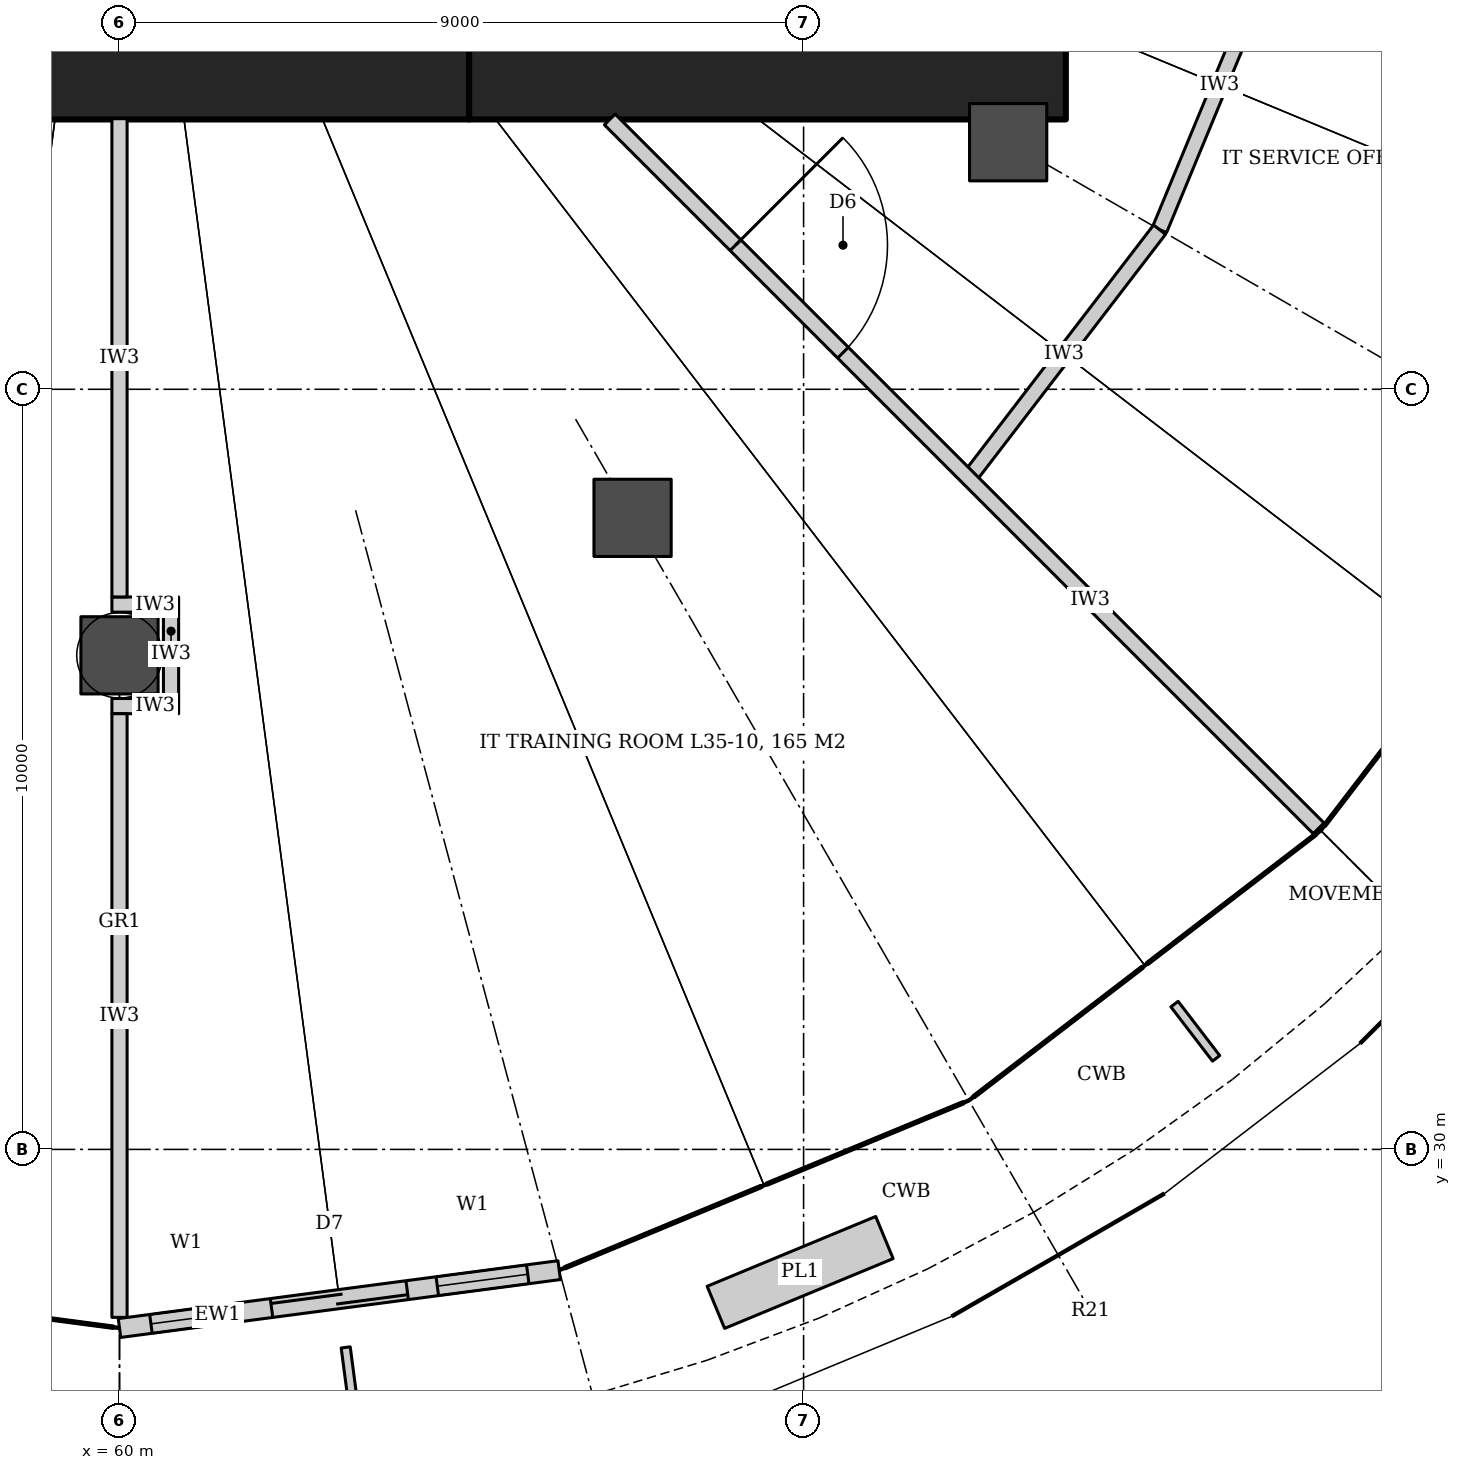
"""IFC4 building model, lengths in metres.
Left out: names, types, materials, properties, quantities, classifications, styles, units other than length and angle.
Written with IfcOpenShell. Run it as: python <this file> out.ifc"""

import sys

from ifc_helpers import new_model, si_unit, direction, frame, frame_2d, origin, origin_2d, place, context, subcontext, project, spatial, rectangle, hollow_circle, extrude, element, fill, save


model = new_model("IFC4")
c1 = context("Model", 3, precision=1e-05, world=origin(), true_north=direction((0.0, 1.0)))
c2 = subcontext(c1, "Body", "Model", "MODEL_VIEW")
j1 = project(units=[si_unit("LENGTHUNIT", "METRE"), si_unit("PLANEANGLEUNIT", "RADIAN")], contexts=[c1])
p1 = place(None, origin())
s1 = spatial("IfcSite", under=j1, at=p1, CompositionType="ELEMENT")
p2 = place(p1, origin())
s2 = spatial("IfcBuilding", under=s1, at=p2, CompositionType="ELEMENT")
p3 = place(p2, frame((0.0, 0.0, 147.8)))
s3 = spatial("IfcBuildingStorey", under=s2, at=p3, CompositionType="ELEMENT", Elevation=147.8)
p4 = place(p3, frame((55.4, 44.45, 0.0), z_axis=(0.0, 0.0, 1.0), x_axis=(1.0, 0.0, 0.0)))
e1 = element("IfcWall", 1, at=p4, inside=s3, PredefinedType="SHEAR", context=c2, shape_type="SweptSolid", body=[
    extrude(rectangle(XDim=9.2, YDim=1.8, at=frame_2d((4.6, 0.0))), origin(), (0.0, 0.0, 1.0), 4.2),
])
p5 = place(p3, frame((64.6, 44.45, 0.0), z_axis=(0.0, 0.0, 1.0), x_axis=(1.0, 0.0, 0.0)))
e2 = element("IfcWall", 2, at=p5, inside=s3, PredefinedType="SHEAR", context=c2, shape_type="SweptSolid", body=[
    extrude(rectangle(XDim=7.85, YDim=1.8, at=frame_2d((3.925, 0.0))), origin(), (0.0, 0.0, 1.0), 4.2),
])
for number, where, z_axis, x_axis in (
    (3, (60.0, 36.5, 0.0), (0.0, 0.0, 1.0), (1.0, 0.0, 0.0)),
    (4, (66.75, 38.309, 0.0), (0.0, 0.0, 1.0), (1.0, 0.0, 0.0)),
    (5, (71.691, 43.25, 0.0), (0.0, 0.0, 1.0), (1.0, 0.0, 0.0)),
):
    element("IfcColumn", number, at=place(p3, frame(where, z_axis=z_axis, x_axis=x_axis)), inside=s3, PredefinedType="COLUMN", context=c2, shape_type="SweptSolid", body=[
        extrude(hollow_circle(Radius=0.508, WallThickness=0.05, at=origin_2d()), origin(), (0.0, 0.0, 1.0), 4.2),
    ])
p6 = place(p3, frame((75.262, 45.911, 0.0), z_axis=(0.0, 0.0, 1.0), x_axis=(-0.382731667114, -0.923859551549, 0.0)))
e6 = element("IfcWall", 6, at=p6, inside=s3, PredefinedType="PARTITIONING", context=c2, shape_type="SweptSolid", body=[
    extrude(rectangle(XDim=4.125, YDim=0.2, at=frame_2d((2.062, 0.0))), origin(), (0.0, 0.0, 1.0), 3.04),
])
p7 = place(p3, frame((73.683, 42.1, 0.0), z_axis=(0.0, 0.0, 1.0), x_axis=(-0.608714823874, -0.793389099494, 0.0)))
e7 = element("IfcWall", 7, at=p7, inside=s3, PredefinedType="PARTITIONING", context=c2, shape_type="SweptSolid", body=[
    extrude(rectangle(XDim=4.125, YDim=0.2, at=frame_2d((2.062, 0.0))), origin(), (0.0, 0.0, 1.0), 3.04),
])
for number, where, z_axis, x_axis in (
    (8, (59.9, 37.168, 0.0), (0.0, 0.0, 1.0), (1.0, 0.0, 0.0)),
    (9, (59.9, 35.832, 0.0), (0.0, 0.0, 1.0), (1.0, 0.0, 0.0)),
):
    element("IfcWall", number, at=place(p3, frame(where, z_axis=z_axis, x_axis=x_axis)), inside=s3, PredefinedType="PARTITIONING", context=c2, shape_type="SweptSolid", body=[
        extrude(rectangle(XDim=0.878, YDim=0.2, at=frame_2d((0.439, 0.0))), origin(), (0.0, 0.0, 1.0), 3.02),
    ])
p8 = place(p3, frame((60.678, 37.068, 0.0), z_axis=(0.0, 0.0, 1.0), x_axis=(0.0, -1.0, 0.0)))
e10 = element("IfcWall", 10, at=p8, inside=s3, PredefinedType="PARTITIONING", context=c2, shape_type="SweptSolid", body=[
    extrude(rectangle(XDim=1.136, YDim=0.2, at=frame_2d((0.568, 0.0))), origin(), (0.0, 0.0, 1.0), 3.02),
])
p9 = place(p3, frame((60.0, 43.56, 0.0), z_axis=(0.0, 0.0, 1.0), x_axis=(0.0, -1.0, 0.0)))
e11 = element("IfcWall", 11, at=p9, inside=s3, PredefinedType="PARTITIONING", context=c2, shape_type="SweptSolid", body=[
    extrude(rectangle(XDim=6.292, YDim=0.2, at=frame_2d((3.146, 0.0))), origin(), (0.0, 0.0, 1.0), 3.04),
])
p10 = place(p3, frame((60.0, 35.732, 0.0), z_axis=(0.0, 0.0, 1.0), x_axis=(0.0, -1.0, 0.0)))
e12 = element("IfcWall", 12, at=p10, inside=s3, PredefinedType="PARTITIONING", context=c2, shape_type="SweptSolid", body=[
    extrude(rectangle(XDim=8.042, YDim=0.2, at=frame_2d((4.021, 0.0))), origin(), (0.0, 0.0, 1.0), 3.04),
])
p11 = place(p3, frame((66.45, 43.55, 0.0), z_axis=(0.0, 0.0, 1.0), x_axis=(0.707106781187, -0.707106781187, 0.0)))
e13 = element("IfcWall", 13, at=p11, inside=s3, PredefinedType="PARTITIONING", context=c2, shape_type="SweptSolid", body=[
    extrude(rectangle(XDim=13.288, YDim=0.2, at=frame_2d((6.644, 0.0))), origin(), (0.0, 0.0, 1.0), 3.02),
])
p12 = place(p11, frame((2.339, 0.0, 0.0)))
e14 = element("IfcOpeningElement", 14, at=p12, cuts=e13, PredefinedType="OPENING", context=c2, shape_type="SweptSolid", body=[
    extrude(rectangle(XDim=2.0, YDim=2.1, at=frame_2d((1.0, 1.05))), frame((0.0, 0.11, 0.0), z_axis=(0.0, -1.0, 0.0), x_axis=(1.0, 0.0, 0.0)), (0.0, 0.0, 1.0), 0.22),
])
p13 = place(p3, frame((60.0, 27.55, 0.0), z_axis=(0.0, 0.0, 1.0), x_axis=(0.991446637263, 0.130512702292, 0.0)))
e15 = element("IfcWall", 15, at=p13, inside=s3, PredefinedType="SOLIDWALL", context=c2, shape_type="SweptSolid", body=[
    extrude(rectangle(XDim=5.861, YDim=0.25, at=frame_2d((2.93, 0.0))), origin(), (0.0, 0.0, 1.0), 4.04),
])
p14 = place(p13, frame((2.03, 0.0, 0.0)))
e16 = element("IfcOpeningElement", 16, at=p14, cuts=e15, PredefinedType="OPENING", context=c2, shape_type="SweptSolid", body=[
    extrude(rectangle(XDim=1.8, YDim=2.4, at=frame_2d((0.9, 1.2))), frame((0.0, 0.135, 0.0), z_axis=(0.0, -1.0, 0.0), x_axis=(1.0, 0.0, 0.0)), (0.0, 0.0, 1.0), 0.27),
])
p15 = place(p13, frame((0.43, 0.0, 0.0)))
e17 = element("IfcOpeningElement", 17, at=p15, cuts=e15, PredefinedType="OPENING", context=c2, shape_type="SweptSolid", body=[
    extrude(rectangle(XDim=1.2, YDim=2.4, at=frame_2d((0.6, 1.2))), frame((0.0, 0.135, 0.0), z_axis=(0.0, -1.0, 0.0), x_axis=(1.0, 0.0, 0.0)), (0.0, 0.0, 1.0), 0.27),
])
p16 = place(p13, frame((4.23, 0.0, 0.0)))
e18 = element("IfcOpeningElement", 18, at=p16, cuts=e15, PredefinedType="OPENING", context=c2, shape_type="SweptSolid", body=[
    extrude(rectangle(XDim=1.2, YDim=2.4, at=frame_2d((0.6, 1.2))), frame((0.0, 0.135, 0.0), z_axis=(0.0, -1.0, 0.0), x_axis=(1.0, 0.0, 0.0)), (0.0, 0.0, 1.0), 0.27),
])
p17 = place(p12, origin())
e19 = element("IfcDoor", 19, at=p17, inside=s3, OperationType="DOUBLE_DOOR_DOUBLE_SWING", PredefinedType="DOOR", context=c2, shape_type="SweptSolid", body=[
    extrude(rectangle(XDim=2.0, YDim=2.1, at=frame_2d((1.0, 1.05))), frame((0.0, 0.025, 0.0), z_axis=(0.0, -1.0, 0.0), x_axis=(1.0, 0.0, 0.0)), (0.0, 0.0, 1.0), 0.05),
])
fill(e14, e19)
p18 = place(p14, origin())
e20 = element("IfcDoor", 20, at=p18, inside=s3, OperationType="DOUBLE_DOOR_SLIDING", PredefinedType="DOOR", context=c2, shape_type="SweptSolid", body=[
    extrude(rectangle(XDim=1.8, YDim=2.4, at=frame_2d((0.9, 1.2))), frame((0.0, 0.025, 0.0), z_axis=(0.0, -1.0, 0.0), x_axis=(1.0, 0.0, 0.0)), (0.0, 0.0, 1.0), 0.05),
])
fill(e16, e20)
p19 = place(p15, origin())
e21 = element("IfcWindow", 21, at=p19, inside=s3, PartitioningType="SINGLE_PANEL", PredefinedType="WINDOW", context=c2, shape_type="SweptSolid", body=[
    extrude(rectangle(XDim=1.2, YDim=2.4, at=frame_2d((0.6, 1.2))), frame((0.0, 0.03, 0.0), z_axis=(0.0, -1.0, 0.0), x_axis=(1.0, 0.0, 0.0)), (0.0, 0.0, 1.0), 0.06),
])
fill(e17, e21)
p20 = place(p16, origin())
e22 = element("IfcWindow", 22, at=p20, inside=s3, PartitioningType="SINGLE_PANEL", PredefinedType="WINDOW", context=c2, shape_type="SweptSolid", body=[
    extrude(rectangle(XDim=1.2, YDim=2.4, at=frame_2d((0.6, 1.2))), frame((0.0, 0.03, 0.0), z_axis=(0.0, -1.0, 0.0), x_axis=(1.0, 0.0, 0.0)), (0.0, 0.0, 1.0), 0.06),
])
fill(e18, e22)
save(model, sys.argv[1])
